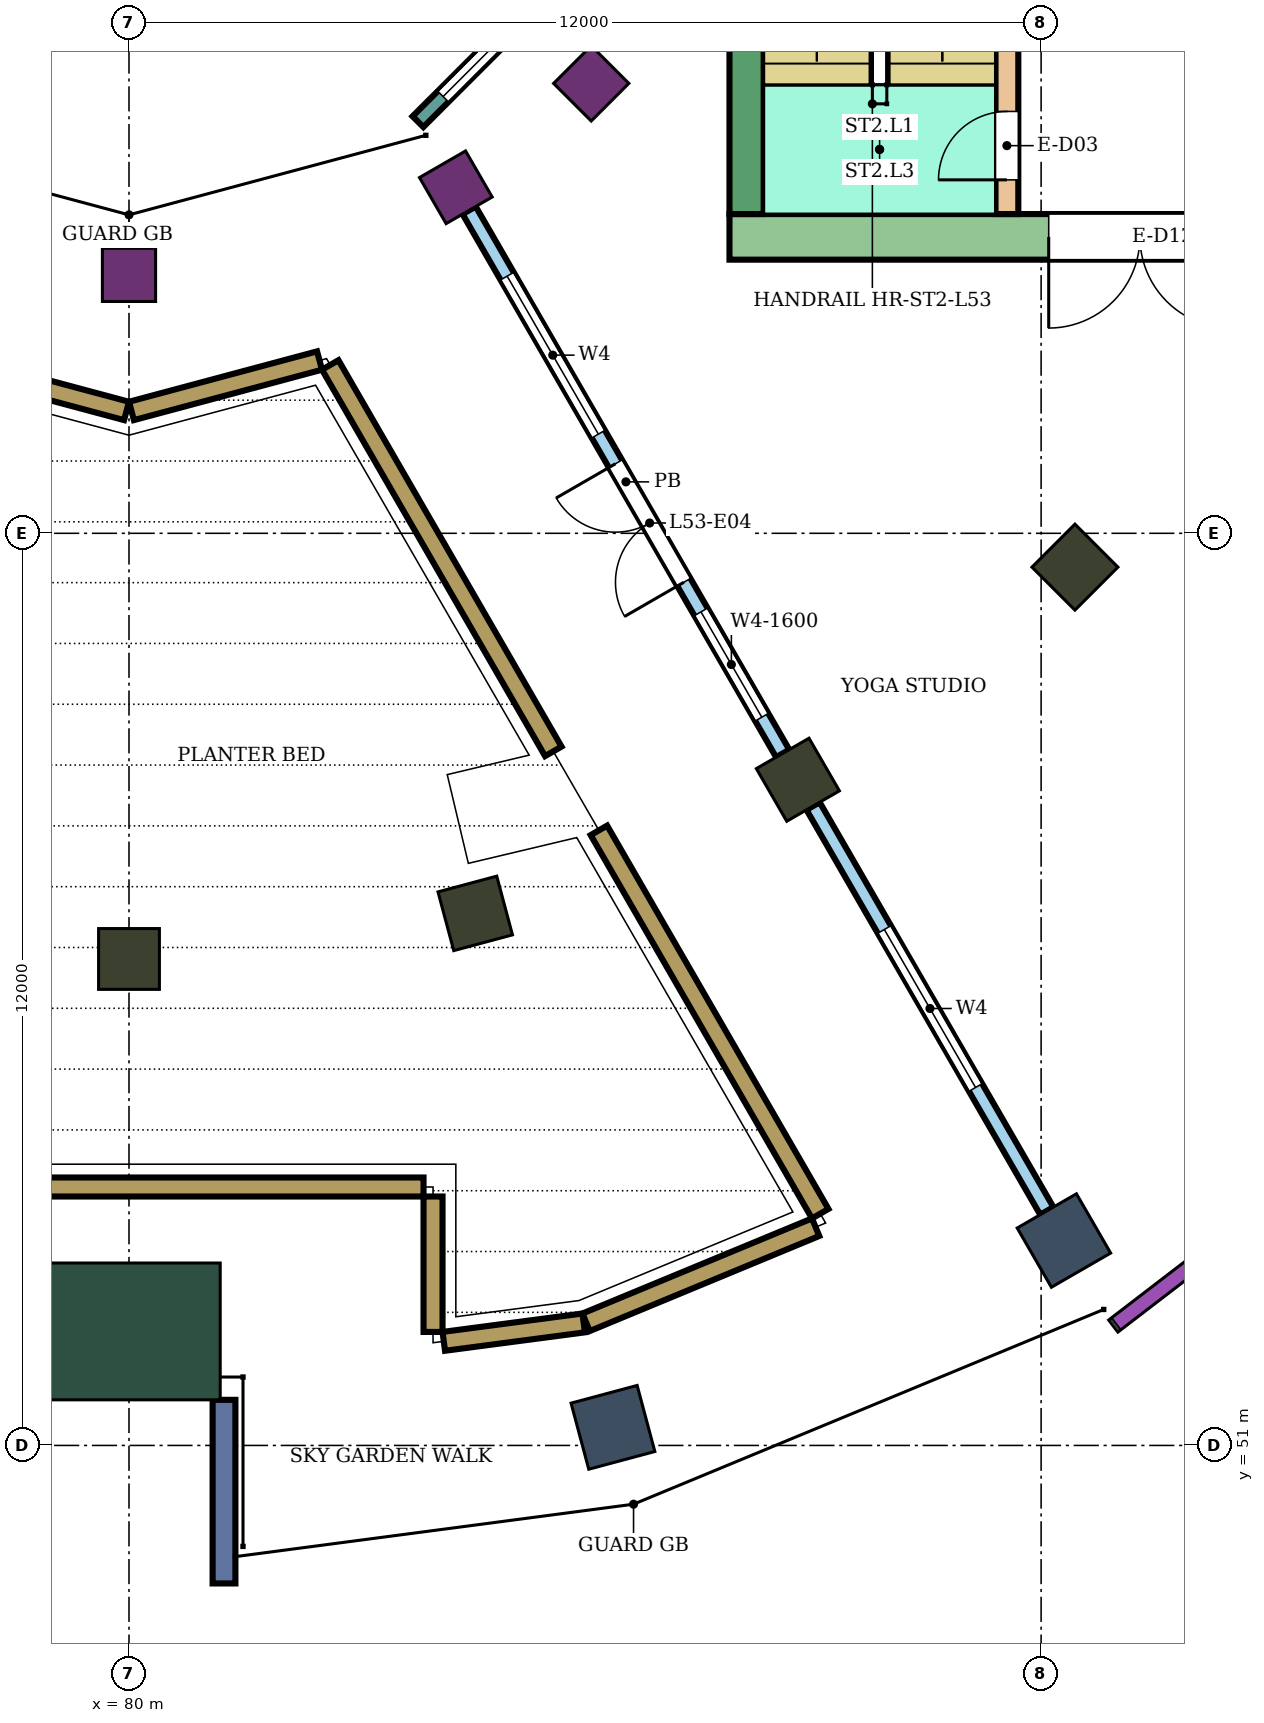
"""IFC4 building model, lengths in metres.
Left out: names, types, materials, properties, quantities, classifications, styles, units other than length and angle.
Written with IfcOpenShell. Run it as: python <this file> out.ifc"""

import sys

from ifc_helpers import new_model, si_unit, direction, frame, frame_2d, origin, origin_2d, place, context, subcontext, project, spatial, rectangle, extrude, element, fill, save


model = new_model("IFC4")
c1 = context("Model", 3, precision=1e-05, world=origin(), true_north=direction((0.0, 1.0)))
c2 = subcontext(c1, "Body", "Model", "MODEL_VIEW")
j1 = project(units=[si_unit("LENGTHUNIT", "METRE"), si_unit("PLANEANGLEUNIT", "RADIAN")], contexts=[c1])
p1 = place(None, origin())
s1 = spatial("IfcSite", under=j1, at=p1, CompositionType="ELEMENT")
p2 = place(p1, origin())
s2 = spatial("IfcBuilding", under=s1, at=p2, CompositionType="ELEMENT")
p3 = place(p2, frame((0.0, 0.0, 229.3)))
s3 = spatial("IfcBuildingStorey", under=s2, at=p3, CompositionType="ELEMENT", Elevation=229.3)
for number, where, z_axis, x_axis in (
    (1, (86.367, 51.238, 0.0), (0.0, 0.0, 1.0), (0.259, -0.966, 0.0)),
    (2, (92.3, 53.696, 0.0), (0.0, 0.0, 1.0), (0.5, -0.866, 0.0)),
):
    element("IfcColumn", number, at=place(p3, frame(where, z_axis=z_axis, x_axis=x_axis)), inside=s3, PredefinedType="COLUMN", context=c2, shape_type="SweptSolid", body=[
        extrude(rectangle(XDim=0.9, YDim=0.9, at=origin_2d()), origin(), (0.0, 0.0, 1.0), 8.0),
    ])
for number, where, z_axis, x_axis in (
    (3, (80.0, 57.4, 0.0), (0.0, 0.0, 1.0), (0.0, -1.0, 0.0)),
    (4, (84.555, 58.0, 0.0), (0.0, 0.0, 1.0), (0.259, -0.966, 0.0)),
    (5, (88.8, 59.758, 0.0), (0.0, 0.0, 1.0), (0.5, -0.866, 0.0)),
    (6, (92.445, 62.555, 0.0), (0.0, 0.0, 1.0), (0.707, -0.707, 0.0)),
):
    element("IfcColumn", number, at=place(p3, frame(where, z_axis=z_axis, x_axis=x_axis)), inside=s3, PredefinedType="COLUMN", context=c2, shape_type="SweptSolid", body=[
        extrude(rectangle(XDim=0.8, YDim=0.8, at=origin_2d()), origin(), (0.0, 0.0, 1.0), 8.0),
    ])
for number, where, z_axis, x_axis in (
    (7, (80.0, 66.4, 0.0), (0.0, 0.0, 1.0), (0.0, -1.0, 0.0)),
    (8, (84.3, 67.552, 0.0), (0.0, 0.0, 1.0), (0.5, -0.866, 0.0)),
    (9, (86.081, 68.919, 0.0), (0.0, 0.0, 1.0), (0.707, -0.707, 0.0)),
):
    element("IfcColumn", number, at=place(p3, frame(where, z_axis=z_axis, x_axis=x_axis)), inside=s3, PredefinedType="COLUMN", context=c2, shape_type="SweptSolid", body=[
        extrude(rectangle(XDim=0.7, YDim=0.7, at=origin_2d()), origin(), (0.0, 0.0, 1.0), 8.0),
    ])
p4 = place(p3, frame((80.0, 52.5, 0.0), z_axis=(0.0, 0.0, 1.0), x_axis=(0.0, -1.0, 0.0)))
e10 = element("IfcColumn", 10, at=p4, inside=s3, PredefinedType="COLUMN", context=c2, shape_type="SweptSolid", body=[
    extrude(rectangle(XDim=1.8, YDim=2.4, at=origin_2d()), origin(), (0.0, 0.0, 1.0), 8.0),
])
p5 = place(p3, frame((87.9, 66.9, 0.0), z_axis=(0.0, 0.0, 1.0), x_axis=(1.0, 0.0, 0.0)))
e11 = element("IfcWall", 11, at=p5, inside=s3, PredefinedType="SHEAR", context=c2, shape_type="SweptSolid", body=[
    extrude(rectangle(XDim=14.9, YDim=0.6, at=frame_2d((7.45, 0.0))), origin(), (0.0, 0.0, 1.0), 7.68),
])
p6 = place(p5, frame((4.2, 0.0, 0.0)))
e12 = element("IfcOpeningElement", 12, at=p6, cuts=e11, PredefinedType="OPENING", context=c2, shape_type="SweptSolid", body=[
    extrude(rectangle(XDim=2.4, YDim=2.4, at=frame_2d((1.2, 1.2))), frame((0.0, 0.31, 0.0), z_axis=(0.0, -1.0, 0.0), x_axis=(1.0, 0.0, 0.0)), (0.0, 0.0, 1.0), 0.62),
])
p7 = place(p3, frame((88.125, 67.2, 0.0), z_axis=(0.0, 0.0, 1.0), x_axis=(0.0, 1.0, 0.0)))
e13 = element("IfcWall", 13, at=p7, inside=s3, PredefinedType="SHEAR", context=c2, shape_type="SweptSolid", body=[
    extrude(rectangle(XDim=7.8, YDim=0.45, at=frame_2d((3.9, 0.0))), origin(), (0.0, 0.0, 1.0), 7.68),
])
p8 = place(p3, frame((91.55, 67.2, 0.0), z_axis=(0.0, 0.0, 1.0), x_axis=(0.0, 1.0, 0.0)))
e14 = element("IfcWall", 14, at=p8, inside=s3, PredefinedType="SHEAR", context=c2, shape_type="SweptSolid", body=[
    extrude(rectangle(XDim=7.8, YDim=0.3, at=frame_2d((3.9, 0.0))), origin(), (0.0, 0.0, 1.0), 7.68),
])
p9 = place(p8, frame((0.45, 0.0, 0.0)))
e15 = element("IfcOpeningElement", 15, at=p9, cuts=e14, PredefinedType="OPENING", context=c2, shape_type="SweptSolid", body=[
    extrude(rectangle(XDim=0.9, YDim=2.1, at=frame_2d((0.45, 1.05))), frame((0.0, 0.16, 0.0), z_axis=(0.0, -1.0, 0.0), x_axis=(1.0, 0.0, 0.0)), (0.0, 0.0, 1.0), 0.32),
])
p10 = place(p3, frame((81.25, 51.6, 0.0), z_axis=(0.0, 0.0, 1.0), x_axis=(0.0, -1.0, 0.0)))
e16 = element("IfcWall", 16, at=p10, inside=s3, PredefinedType="NOTDEFINED", context=c2, shape_type="SweptSolid", body=[
    extrude(rectangle(XDim=2.416, YDim=0.3, at=frame_2d((1.208, 0.0))), origin(), (0.0, 0.0, 1.0), 8.0),
])
p11 = place(p3, frame((83.802, 68.415, 0.0), z_axis=(0.0, 0.0, 1.0), x_axis=(0.707106781187, 0.707106781187, 0.0)))
e17 = element("IfcWall", 17, at=p11, inside=s3, PredefinedType="NOTDEFINED", context=c2, shape_type="SweptSolid", body=[
    extrude(rectangle(XDim=3.936, YDim=0.2, at=frame_2d((1.968, 0.0))), origin(), (0.0, 0.0, 1.0), 8.0),
])
p12 = place(p11, frame((0.468, 0.0, 0.9)))
e18 = element("IfcOpeningElement", 18, at=p12, cuts=e17, PredefinedType="OPENING", context=c2, shape_type="SweptSolid", body=[
    extrude(rectangle(XDim=3.0, YDim=2.3, at=frame_2d((1.5, 1.15))), frame((0.0, 0.11, 0.0), z_axis=(0.0, -1.0, 0.0), x_axis=(1.0, 0.0, 0.0)), (0.0, 0.0, 1.0), 0.22),
])
p13 = place(p3, frame((76.125, 54.4, 0.0), z_axis=(0.0, 0.0, 1.0), x_axis=(1.0, 0.0, 0.0)))
e19 = element("IfcWall", 19, at=p13, inside=s3, PredefinedType="USERDEFINED", context=c2, shape_type="SweptSolid", body=[
    extrude(rectangle(XDim=7.75, YDim=0.25, at=frame_2d((3.875, 0.0))), origin(), (0.0, 0.0, 1.0), 0.6),
])
p14 = place(p3, frame((84.0, 54.275, 0.0), z_axis=(0.0, 0.0, 1.0), x_axis=(0.0, -1.0, 0.0)))
e20 = element("IfcWall", 20, at=p14, inside=s3, PredefinedType="USERDEFINED", context=c2, shape_type="SweptSolid", body=[
    extrude(rectangle(XDim=1.781, YDim=0.25, at=frame_2d((0.891, 0.0))), origin(), (0.0, 0.0, 1.0), 0.6),
])
p15 = place(p3, frame((84.141, 52.369, 0.0), z_axis=(0.0, 0.0, 1.0), x_axis=(0.991436829887, 0.130587182926, 0.0)))
e21 = element("IfcWall", 21, at=p15, inside=s3, PredefinedType="USERDEFINED", context=c2, shape_type="SweptSolid", body=[
    extrude(rectangle(XDim=1.856, YDim=0.25, at=frame_2d((0.928, 0.0))), origin(), (0.0, 0.0, 1.0), 0.6),
])
p16 = place(p3, frame((86.014, 52.62, 0.0), z_axis=(0.0, 0.0, 1.0), x_axis=(0.923863886655, 0.382721202621, 0.0)))
e22 = element("IfcWall", 22, at=p16, inside=s3, PredefinedType="USERDEFINED", context=c2, shape_type="SweptSolid", body=[
    extrude(rectangle(XDim=3.269, YDim=0.25, at=frame_2d((1.634, 0.0))), origin(), (0.0, 0.0, 1.0), 0.6),
])
p17 = place(p3, frame((89.094, 54.049, 0.0), z_axis=(0.0, 0.0, 1.0), x_axis=(-0.50000795037, 0.866020813587, 0.0)))
e23 = element("IfcWall", 23, at=p17, inside=s3, PredefinedType="USERDEFINED", context=c2, shape_type="SweptSolid", body=[
    extrude(rectangle(XDim=5.823, YDim=0.25, at=frame_2d((2.912, 0.0))), origin(), (0.0, 0.0, 1.0), 0.6),
])
p18 = place(p3, frame((85.582, 60.131, 0.0), z_axis=(0.0, 0.0, 1.0), x_axis=(-0.499999689456, 0.866025583077, 0.0)))
e24 = element("IfcWall", 24, at=p18, inside=s3, PredefinedType="USERDEFINED", context=c2, shape_type="SweptSolid", body=[
    extrude(rectangle(XDim=5.87, YDim=0.25, at=frame_2d((2.935, 0.0))), origin(), (0.0, 0.0, 1.0), 0.6),
])
for number, where, z_axis, x_axis in (
    (25, (82.507, 65.273, 0.0), (0.0, 0.0, 1.0), (-0.966, -0.259, 0.0)),
    (26, (79.968, 64.61, 0.0), (0.0, 0.0, 1.0), (-0.966, 0.259, 0.0)),
):
    element("IfcWall", number, at=place(p3, frame(where, z_axis=z_axis, x_axis=x_axis)), inside=s3, PredefinedType="USERDEFINED", context=c2, shape_type="SweptSolid", body=[
        extrude(rectangle(XDim=2.562, YDim=0.25, at=frame_2d((1.281, 0.0))), origin(), (0.0, 0.0, 1.0), 0.6),
    ])
p19 = place(p3, frame((84.475, 67.249, 0.0), z_axis=(0.0, 0.0, 1.0), x_axis=(0.499996545922, -0.866027397988, 0.0)))
e27 = element("IfcWall", 27, at=p19, inside=s3, PredefinedType="NOTDEFINED", context=c2, shape_type="SweptSolid", body=[
    extrude(rectangle(XDim=8.25, YDim=0.2, at=frame_2d((4.125, 0.0))), origin(), (0.0, 0.0, 1.0), 8.0),
])
p20 = place(p19, frame((1.0, 0.0, 0.3)))
e28 = element("IfcOpeningElement", 28, at=p20, cuts=e27, PredefinedType="OPENING", context=c2, shape_type="SweptSolid", body=[
    extrude(rectangle(XDim=2.4, YDim=3.6, at=frame_2d((1.2, 1.8))), frame((0.0, 0.11, 0.0), z_axis=(0.0, -1.0, 0.0), x_axis=(1.0, 0.0, 0.0)), (0.0, 0.0, 1.0), 0.22),
])
p21 = place(p19, frame((3.85, 0.0, 0.0)))
e29 = element("IfcOpeningElement", 29, at=p21, cuts=e27, PredefinedType="OPENING", context=c2, shape_type="SweptSolid", body=[
    extrude(rectangle(XDim=1.8, YDim=2.4, at=frame_2d((0.9, 1.2))), frame((0.0, 0.11, 0.0), z_axis=(0.0, -1.0, 0.0), x_axis=(1.0, 0.0, 0.0)), (0.0, 0.0, 1.0), 0.22),
])
p22 = place(p19, frame((6.1, 0.0, 0.3)))
e30 = element("IfcOpeningElement", 30, at=p22, cuts=e27, PredefinedType="OPENING", context=c2, shape_type="SweptSolid", body=[
    extrude(rectangle(XDim=1.6, YDim=3.6, at=frame_2d((0.8, 1.8))), frame((0.0, 0.11, 0.0), z_axis=(0.0, -1.0, 0.0), x_axis=(1.0, 0.0, 0.0)), (0.0, 0.0, 1.0), 0.22),
])
p23 = place(p3, frame((89.0, 59.412, 0.0), z_axis=(0.0, 0.0, 1.0), x_axis=(0.499985903289, -0.866033542371, 0.0)))
e31 = element("IfcWall", 31, at=p23, inside=s3, PredefinedType="NOTDEFINED", context=c2, shape_type="SweptSolid", body=[
    extrude(rectangle(XDim=6.15, YDim=0.2, at=frame_2d((3.075, 0.0))), origin(), (0.0, 0.0, 1.0), 8.0),
])
p24 = place(p23, frame((1.875, 0.0, 0.3)))
e32 = element("IfcOpeningElement", 32, at=p24, cuts=e31, PredefinedType="OPENING", context=c2, shape_type="SweptSolid", body=[
    extrude(rectangle(XDim=2.4, YDim=3.6, at=frame_2d((1.2, 1.8))), frame((0.0, 0.11, 0.0), z_axis=(0.0, -1.0, 0.0), x_axis=(1.0, 0.0, 0.0)), (0.0, 0.0, 1.0), 0.22),
])
p25 = place(p12, origin())
e33 = element("IfcWindow", 33, at=p25, inside=s3, PartitioningType="SINGLE_PANEL", PredefinedType="WINDOW", context=c2, shape_type="SweptSolid", body=[
    extrude(rectangle(XDim=3.0, YDim=2.3, at=frame_2d((1.5, 1.15))), frame((0.0, 0.03, 0.0), z_axis=(0.0, -1.0, 0.0), x_axis=(1.0, 0.0, 0.0)), (0.0, 0.0, 1.0), 0.06),
])
fill(e18, e33)
p26 = place(p20, origin())
e34 = element("IfcWindow", 34, at=p26, inside=s3, PartitioningType="SINGLE_PANEL", PredefinedType="WINDOW", context=c2, shape_type="SweptSolid", body=[
    extrude(rectangle(XDim=2.4, YDim=3.6, at=frame_2d((1.2, 1.8))), frame((0.0, 0.03, 0.0), z_axis=(0.0, -1.0, 0.0), x_axis=(1.0, 0.0, 0.0)), (0.0, 0.0, 1.0), 0.06),
])
fill(e28, e34)
p27 = place(p21, frame((1.8, 0.0, 0.0), z_axis=(0.0, 0.0, 1.0), x_axis=(-1.0, 0.0, 0.0)))
e35 = element("IfcDoor", 35, at=p27, inside=s3, OperationType="DOUBLE_DOOR_SINGLE_SWING", PredefinedType="DOOR", context=c2, shape_type="SweptSolid", body=[
    extrude(rectangle(XDim=1.8, YDim=2.4, at=frame_2d((0.9, 1.2))), frame((0.0, 0.025, 0.0), z_axis=(0.0, -1.0, 0.0), x_axis=(1.0, 0.0, 0.0)), (0.0, 0.0, 1.0), 0.05),
])
fill(e29, e35)
p28 = place(p22, origin())
e36 = element("IfcWindow", 36, at=p28, inside=s3, PartitioningType="SINGLE_PANEL", PredefinedType="WINDOW", context=c2, shape_type="SweptSolid", body=[
    extrude(rectangle(XDim=1.6, YDim=3.6, at=frame_2d((0.8, 1.8))), frame((0.0, 0.03, 0.0), z_axis=(0.0, -1.0, 0.0), x_axis=(1.0, 0.0, 0.0)), (0.0, 0.0, 1.0), 0.06),
])
fill(e30, e36)
p29 = place(p24, origin())
e37 = element("IfcWindow", 37, at=p29, inside=s3, PartitioningType="SINGLE_PANEL", PredefinedType="WINDOW", context=c2, shape_type="SweptSolid", body=[
    extrude(rectangle(XDim=2.4, YDim=3.6, at=frame_2d((1.2, 1.8))), frame((0.0, 0.03, 0.0), z_axis=(0.0, -1.0, 0.0), x_axis=(1.0, 0.0, 0.0)), (0.0, 0.0, 1.0), 0.06),
])
fill(e32, e37)
p30 = place(p9, origin())
e38 = element("IfcDoor", 38, at=p30, inside=s3, OperationType="SINGLE_SWING_LEFT", PredefinedType="DOOR", context=c2, shape_type="SweptSolid", body=[
    extrude(rectangle(XDim=0.9, YDim=2.1, at=frame_2d((0.45, 1.05))), frame((0.0, 0.025, 0.0), z_axis=(0.0, -1.0, 0.0), x_axis=(1.0, 0.0, 0.0)), (0.0, 0.0, 1.0), 0.05),
])
fill(e15, e38)
p31 = place(p6, frame((2.4, 0.0, 0.0), z_axis=(0.0, 0.0, 1.0), x_axis=(-1.0, 0.0, 0.0)))
e39 = element("IfcDoor", 39, at=p31, inside=s3, OperationType="DOUBLE_DOOR_SINGLE_SWING", PredefinedType="DOOR", context=c2, shape_type="SweptSolid", body=[
    extrude(rectangle(XDim=2.4, YDim=2.4, at=frame_2d((1.2, 1.2))), frame((0.0, 0.025, 0.0), z_axis=(0.0, -1.0, 0.0), x_axis=(1.0, 0.0, 0.0)), (0.0, 0.0, 1.0), 0.05),
])
fill(e12, e39)
save(model, sys.argv[1])
